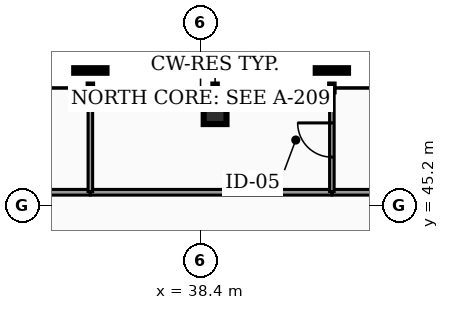
"""IFC4 building model, lengths in metres.
Left out: names, types, materials, properties, quantities, classifications, styles, units other than length and angle.
Written with IfcOpenShell. Run it as: python <this file> out.ifc"""

import sys

from ifc_helpers import new_model, si_unit, direction, frame, frame_2d, origin, origin_2d, place, context, subcontext, project, spatial, rectangle, hollow_rectangle, extrude, element, fill, save


model = new_model("IFC4")
c1 = context("Model", 3, precision=1e-05, world=origin(), true_north=direction((0.0, 1.0)))
c2 = subcontext(c1, "Body", "Model", "MODEL_VIEW")
j1 = project(units=[si_unit("LENGTHUNIT", "METRE"), si_unit("PLANEANGLEUNIT", "RADIAN")], contexts=[c1])
p1 = place(None, origin())
s1 = spatial("IfcSite", under=j1, at=p1, CompositionType="ELEMENT")
p2 = place(p1, origin())
s2 = spatial("IfcBuilding", under=s1, at=p2, CompositionType="ELEMENT")
p3 = place(p2, frame((0.0, 0.0, 222.36)))
s3 = spatial("IfcBuildingStorey", under=s2, at=p3, CompositionType="ELEMENT", Elevation=222.36)
p4 = place(p3, frame((38.782, 47.644, 0.0), z_axis=(0.0, 0.0, 1.0), x_axis=(1.0, 0.0, 0.0)))
e1 = element("IfcColumn", 1, at=p4, inside=s3, PredefinedType="COLUMN", context=c2, shape_type="SweptSolid", body=[
    extrude(hollow_rectangle(XDim=0.6, YDim=0.6, WallThickness=0.03, at=origin_2d()), origin(), (0.0, 0.0, 1.0), 3.18),
])
p5 = place(p3, frame((28.55, 45.55, 0.0), z_axis=(0.0, 0.0, 1.0), x_axis=(1.0, 0.0, 0.0)))
e2 = element("IfcWall", 2, at=p5, inside=s3, PredefinedType="PARTITIONING", context=c2, shape_type="SweptSolid", body=[
    extrude(rectangle(XDim=6.945, YDim=0.15, at=frame_2d((3.473, 0.0))), origin(), (0.0, 0.0, 1.0), 2.235),
])
p6 = place(p3, frame((41.86, 45.55, 0.0), z_axis=(0.0, 0.0, 1.0), x_axis=(1.0, 0.0, 0.0)))
e3 = element("IfcWall", 3, at=p6, inside=s3, PredefinedType="PARTITIONING", context=c2, shape_type="SweptSolid", body=[
    extrude(rectangle(XDim=6.49, YDim=0.15, at=frame_2d((3.245, 0.0))), origin(), (0.0, 0.0, 1.0), 2.235),
])
p7 = place(p3, frame((35.505, 45.55, 0.0), z_axis=(0.0, 0.0, 1.0), x_axis=(1.0, 0.0, 0.0)))
e4 = element("IfcWall", 4, at=p7, inside=s3, PredefinedType="PARTITIONING", context=c2, shape_type="SweptSolid", body=[
    extrude(rectangle(XDim=6.345, YDim=0.15, at=frame_2d((3.173, 0.0))), origin(), (0.0, 0.0, 1.0), 2.235),
])
p8 = place(p3, frame((35.5, 45.57, 0.0), z_axis=(0.0, 0.0, 1.0), x_axis=(0.0, 1.0, 0.0)))
e5 = element("IfcWall", 5, at=p8, inside=s3, PredefinedType="PARTITIONING", context=c2, shape_type="SweptSolid", body=[
    extrude(rectangle(XDim=2.709, YDim=0.12, at=frame_2d((1.354, 0.0))), origin(), (0.0, 0.0, 1.0), 2.235),
])
p9 = place(p3, frame((41.855, 45.57, 0.0), z_axis=(0.0, 0.0, 1.0), x_axis=(0.0, 1.0, 0.0)))
e6 = element("IfcWall", 6, at=p9, inside=s3, PredefinedType="PARTITIONING", context=c2, shape_type="SweptSolid", body=[
    extrude(rectangle(XDim=2.709, YDim=0.12, at=frame_2d((1.354, 0.0))), origin(), (0.0, 0.0, 1.0), 2.235),
])
p10 = place(p9, frame((0.905, 0.0, 0.0)))
e7 = element("IfcOpeningElement", 7, at=p10, cuts=e6, PredefinedType="OPENING", context=c2, shape_type="SweptSolid", body=[
    extrude(rectangle(XDim=0.9, YDim=2.05, at=frame_2d((0.45, 1.025))), frame((0.0, 0.07, 0.0), z_axis=(0.0, -1.0, 0.0), x_axis=(1.0, 0.0, 0.0)), (0.0, 0.0, 1.0), 0.14),
])
p11 = place(p10, origin())
e8 = element("IfcDoor", 8, at=p11, inside=s3, OperationType="SINGLE_SWING_RIGHT", PredefinedType="DOOR", context=c2, shape_type="SweptSolid", body=[
    extrude(rectangle(XDim=0.9, YDim=2.05, at=frame_2d((0.45, 1.025))), frame((0.0, 0.025, 0.0), z_axis=(0.0, -1.0, 0.0), x_axis=(1.0, 0.0, 0.0)), (0.0, 0.0, 1.0), 0.05),
])
fill(e7, e8)
save(model, sys.argv[1])
